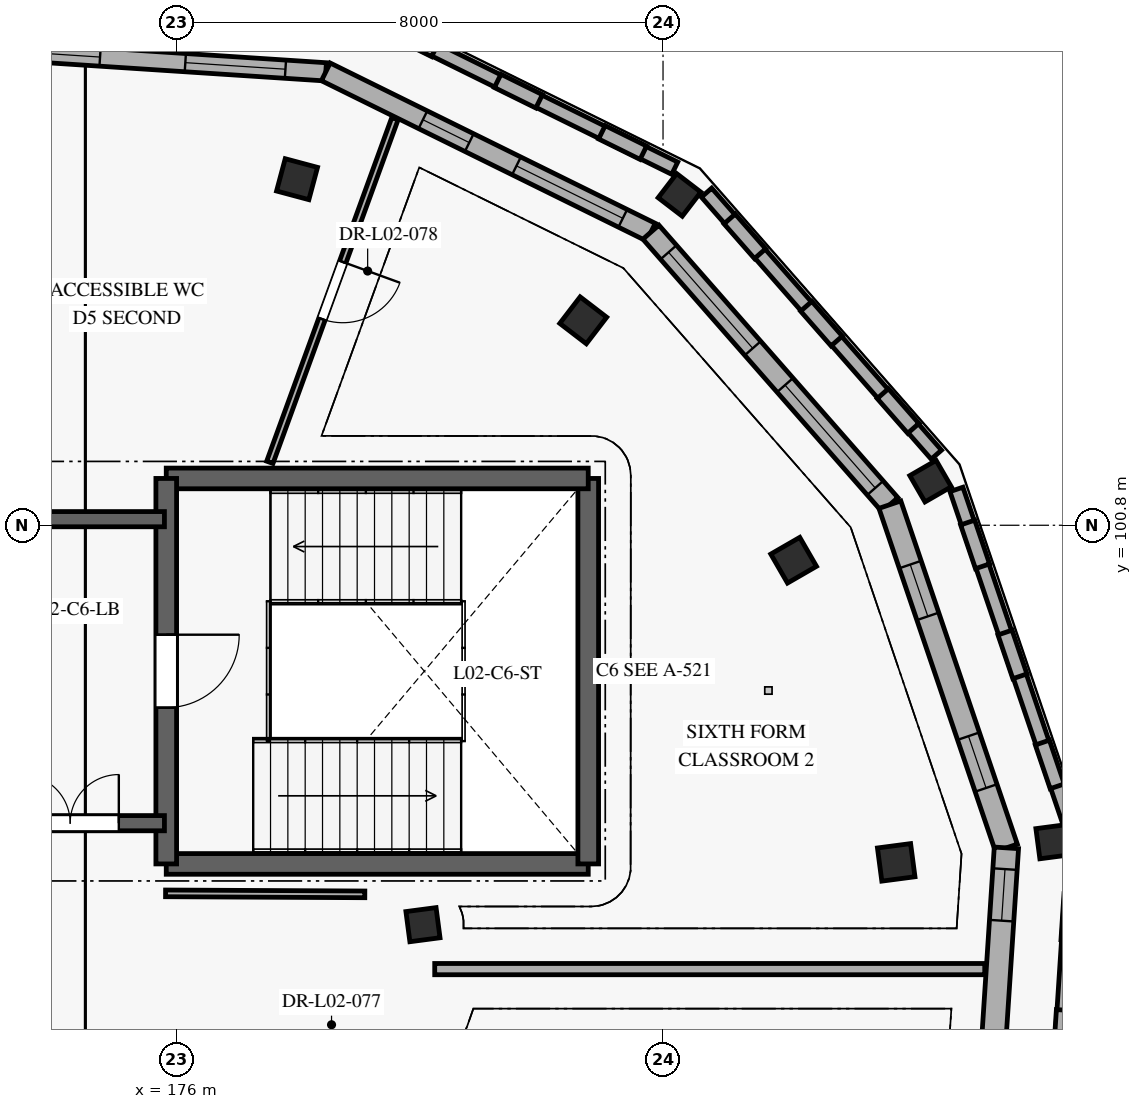
"""IFC4 building model, lengths in metres.
Left out: names, types, materials, properties, quantities, classifications, styles, units other than length and angle.
Written with IfcOpenShell. Run it as: python <this file> out.ifc"""

import sys

from ifc_helpers import new_model, si_unit, direction, frame, frame_2d, origin, origin_2d, place, context, subcontext, project, spatial, rectangle, extrude, element, fill, save


model = new_model("IFC4")
c1 = context("Model", 3, precision=1e-05, world=origin(), true_north=direction((0.0, 1.0)))
c2 = subcontext(c1, "Body", "Model", "MODEL_VIEW")
j1 = project(units=[si_unit("LENGTHUNIT", "METRE"), si_unit("PLANEANGLEUNIT", "RADIAN")], contexts=[c1])
p1 = place(None, origin())
s1 = spatial("IfcSite", under=j1, at=p1, CompositionType="ELEMENT")
p2 = place(p1, origin())
s2 = spatial("IfcBuilding", under=s1, at=p2, CompositionType="ELEMENT")
p3 = place(p2, frame((0.0, 0.0, 8.4)))
s3 = spatial("IfcBuildingStorey", under=s2, at=p3, CompositionType="ELEMENT", Elevation=8.4)
for number, where, z_axis, x_axis in (
    (1, (190.413, 95.595, 0.0), (0.0, 0.0, 1.0), (-0.131, 0.991, 0.0)),
    (2, (188.4, 101.525, 0.0), (0.0, 0.0, 1.0), (-0.5, 0.866, 0.0)),
    (3, (184.271, 106.233, 0.0), (0.0, 0.0, 1.0), (-0.793, 0.609, 0.0)),
):
    element("IfcColumn", number, at=place(p3, frame(where, z_axis=z_axis, x_axis=x_axis)), inside=s3, PredefinedType="COLUMN", context=c2, shape_type="SweptSolid", body=[
        extrude(rectangle(XDim=0.5, YDim=0.5, at=origin_2d()), origin(), (0.0, 0.0, 1.0), 4.2),
    ])
for number, where, z_axis, x_axis in (
    (4, (187.835, 95.256, 0.0), (0.0, 0.0, 1.0), (-0.131, 0.991, 0.0)),
    (5, (186.148, 100.225, 0.0), (0.0, 0.0, 1.0), (-0.5, 0.866, 0.0)),
    (6, (182.688, 104.171, 0.0), (0.0, 0.0, 1.0), (-0.793, 0.609, 0.0)),
    (7, (177.981, 106.492, 0.0), (0.0, 0.0, 1.0), (-0.966, 0.259, 0.0)),
):
    element("IfcColumn", number, at=place(p3, frame(where, z_axis=z_axis, x_axis=x_axis)), inside=s3, PredefinedType="COLUMN", context=c2, shape_type="SweptSolid", body=[
        extrude(rectangle(XDim=0.55, YDim=0.55, at=origin_2d()), origin(), (0.0, 0.0, 1.0), 4.2),
    ])
p4 = place(p3, frame((180.052, 94.231, 0.0), z_axis=(0.0, 0.0, 1.0), x_axis=(0.991444861374, 0.13052619222, 0.0)))
e8 = element("IfcColumn", 8, at=p4, inside=s3, PredefinedType="COLUMN", context=c2, shape_type="SweptSolid", body=[
    extrude(rectangle(XDim=0.5, YDim=0.5, at=origin_2d()), origin(), (0.0, 0.0, 1.0), 4.2),
])
p5 = place(p3, frame((172.506, 108.647, 0.0), z_axis=(0.0, 0.0, 1.0), x_axis=(0.997858658418, -0.065407169492, 0.0)))
e9 = element("IfcWall", 9, at=p5, inside=s3, PredefinedType="SOLIDWALL", context=c2, shape_type="SweptSolid", body=[
    extrude(rectangle(XDim=5.961, YDim=0.3, at=frame_2d((2.98, 0.0))), origin(), (0.0, 0.0, 1.0), 3.94),
])
p6 = place(p5, frame((0.74, 0.0, 0.85)))
e10 = element("IfcOpeningElement", 10, at=p6, cuts=e9, PredefinedType="OPENING", context=c2, shape_type="SweptSolid", body=[
    extrude(rectangle(XDim=1.5, YDim=1.6, at=frame_2d((0.75, 0.8))), frame((0.0, 0.16, 0.0), z_axis=(0.0, -1.0, 0.0), x_axis=(1.0, 0.0, 0.0)), (0.0, 0.0, 1.0), 0.32),
])
p7 = place(p5, frame((3.646, 0.0, 0.85)))
e11 = element("IfcOpeningElement", 11, at=p7, cuts=e9, PredefinedType="OPENING", context=c2, shape_type="SweptSolid", body=[
    extrude(rectangle(XDim=1.65, YDim=1.6, at=frame_2d((0.825, 0.8))), frame((0.0, 0.16, 0.0), z_axis=(0.0, -1.0, 0.0), x_axis=(1.0, 0.0, 0.0)), (0.0, 0.0, 1.0), 0.32),
])
p8 = place(p3, frame((178.454, 108.257, 0.0), z_axis=(0.0, 0.0, 1.0), x_axis=(0.896879104746, -0.442275786664, 0.0)))
e12 = element("IfcWall", 12, at=p8, inside=s3, PredefinedType="SOLIDWALL", context=c2, shape_type="SweptSolid", body=[
    extrude(rectangle(XDim=5.961, YDim=0.325, at=frame_2d((2.98, 0.0))), origin(), (0.0, 0.0, 1.0), 3.94),
])
p9 = place(p8, frame((1.781, 0.0, 0.85)))
e13 = element("IfcOpeningElement", 13, at=p9, cuts=e12, PredefinedType="OPENING", context=c2, shape_type="SweptSolid", body=[
    extrude(rectangle(XDim=0.85, YDim=1.4, at=frame_2d((0.425, 0.7))), frame((0.0, 0.172, 0.0), z_axis=(0.0, -1.0, 0.0), x_axis=(1.0, 0.0, 0.0)), (0.0, 0.0, 1.0), 0.345),
])
p10 = place(p8, frame((3.496, 0.0, 0.85)))
e14 = element("IfcOpeningElement", 14, at=p10, cuts=e12, PredefinedType="OPENING", context=c2, shape_type="SweptSolid", body=[
    extrude(rectangle(XDim=1.95, YDim=1.6, at=frame_2d((0.975, 0.8))), frame((0.0, 0.172, 0.0), z_axis=(0.0, -1.0, 0.0), x_axis=(1.0, 0.0, 0.0)), (0.0, 0.0, 1.0), 0.345),
])
p11 = place(p3, frame((183.801, 105.621, 0.0), z_axis=(0.0, 0.0, 1.0), x_axis=(0.659353757459, -0.751832842143, 0.0)))
e15 = element("IfcWall", 15, at=p11, inside=s3, PredefinedType="SOLIDWALL", context=c2, shape_type="SweptSolid", body=[
    extrude(rectangle(XDim=5.961, YDim=0.35, at=frame_2d((2.98, 0.0))), origin(), (0.0, 0.0, 1.0), 3.94),
])
p12 = place(p11, frame((0.44, 0.0, 0.85)))
e16 = element("IfcOpeningElement", 16, at=p12, cuts=e15, PredefinedType="OPENING", context=c2, shape_type="SweptSolid", body=[
    extrude(rectangle(XDim=2.1, YDim=1.6, at=frame_2d((1.05, 0.8))), frame((0.0, 0.185, 0.0), z_axis=(0.0, -1.0, 0.0), x_axis=(1.0, 0.0, 0.0)), (0.0, 0.0, 1.0), 0.37),
])
p13 = place(p11, frame((3.346, 0.0, 0.85)))
e17 = element("IfcOpeningElement", 17, at=p13, cuts=e15, PredefinedType="OPENING", context=c2, shape_type="SweptSolid", body=[
    extrude(rectangle(XDim=2.25, YDim=1.6, at=frame_2d((1.125, 0.8))), frame((0.0, 0.185, 0.0), z_axis=(0.0, -1.0, 0.0), x_axis=(1.0, 0.0, 0.0)), (0.0, 0.0, 1.0), 0.37),
])
p14 = place(p3, frame((187.731, 101.139, 0.0), z_axis=(0.0, 0.0, 1.0), x_axis=(0.321420298269, -0.94693663561, 0.0)))
e18 = element("IfcWall", 18, at=p14, inside=s3, PredefinedType="SOLIDWALL", context=c2, shape_type="SweptSolid", body=[
    extrude(rectangle(XDim=5.961, YDim=0.38, at=frame_2d((2.98, 0.0))), origin(), (0.0, 0.0, 1.0), 3.94),
])
p15 = place(p14, frame((1.04, 0.0, 0.85)))
e19 = element("IfcOpeningElement", 19, at=p15, cuts=e18, PredefinedType="OPENING", context=c2, shape_type="SweptSolid", body=[
    extrude(rectangle(XDim=0.9, YDim=1.6, at=frame_2d((0.45, 0.8))), frame((0.0, 0.2, 0.0), z_axis=(0.0, -1.0, 0.0), x_axis=(1.0, 0.0, 0.0)), (0.0, 0.0, 1.0), 0.4),
])
p16 = place(p14, frame((4.021, 0.0, 0.85)))
e20 = element("IfcOpeningElement", 20, at=p16, cuts=e18, PredefinedType="OPENING", context=c2, shape_type="SweptSolid", body=[
    extrude(rectangle(XDim=0.9, YDim=1.6, at=frame_2d((0.45, 0.8))), frame((0.0, 0.2, 0.0), z_axis=(0.0, -1.0, 0.0), x_axis=(1.0, 0.0, 0.0)), (0.0, 0.0, 1.0), 0.4),
])
p17 = place(p3, frame((189.647, 95.494, 0.0), z_axis=(0.0, 0.0, 1.0), x_axis=(-0.065407169492, -0.997858658418, 0.0)))
e21 = element("IfcWall", 21, at=p17, inside=s3, PredefinedType="SOLIDWALL", context=c2, shape_type="SweptSolid", body=[
    extrude(rectangle(XDim=5.961, YDim=0.4, at=frame_2d((2.98, 0.0))), origin(), (0.0, 0.0, 1.0), 3.94),
])
p18 = place(p17, frame((0.35, 0.0, 0.85)))
e22 = element("IfcOpeningElement", 22, at=p18, cuts=e21, PredefinedType="OPENING", context=c2, shape_type="SweptSolid", body=[
    extrude(rectangle(XDim=0.85, YDim=1.4, at=frame_2d((0.425, 0.7))), frame((0.0, 0.21, 0.0), z_axis=(0.0, -1.0, 0.0), x_axis=(1.0, 0.0, 0.0)), (0.0, 0.0, 1.0), 0.42),
])
p19 = place(p17, frame((3.896, 0.0, 0.85)))
e23 = element("IfcOpeningElement", 23, at=p19, cuts=e21, PredefinedType="OPENING", context=c2, shape_type="SweptSolid", body=[
    extrude(rectangle(XDim=1.15, YDim=1.8, at=frame_2d((0.575, 0.9))), frame((0.0, 0.21, 0.0), z_axis=(0.0, -1.0, 0.0), x_axis=(1.0, 0.0, 0.0)), (0.0, 0.0, 1.0), 0.42),
])
p20 = place(p3, frame((190.668, 95.961, 0.0), z_axis=(0.0, 0.0, 1.0), x_axis=(-0.321474350277, 0.946918286925, 0.0)))
e24 = element("IfcWall", 24, at=p20, inside=s3, PredefinedType="ELEMENTEDWALL", context=c2, shape_type="SweptSolid", body=[
    extrude(rectangle(XDim=5.732, YDim=0.225, at=frame_2d((2.866, 0.0))), origin(), (0.0, 0.0, 1.0), 1.09),
])
p21 = place(p3, frame((190.483, 96.506, 1.09), z_axis=(0.0, 0.0, 1.0), x_axis=(-0.321332364617, 0.946966478525, 0.0)))
e25 = element("IfcWall", 25, at=p21, inside=s3, PredefinedType="ELEMENTEDWALL", context=c2, shape_type="SweptSolid", body=[
    extrude(rectangle(XDim=0.76, YDim=0.245, at=frame_2d((0.38, 0.0))), origin(), (0.0, 0.0, 1.0), 2.85),
])
p22 = place(p3, frame((189.869, 98.316, 1.09), z_axis=(0.0, 0.0, 1.0), x_axis=(-0.32123461411, 0.946999642396, 0.0)))
e26 = element("IfcWall", 26, at=p22, inside=s3, PredefinedType="ELEMENTEDWALL", context=c2, shape_type="SweptSolid", body=[
    extrude(rectangle(XDim=0.76, YDim=0.245, at=frame_2d((0.38, 0.0))), origin(), (0.0, 0.0, 1.0), 2.85),
])
p23 = place(p3, frame((189.254, 100.125, 1.09), z_axis=(0.0, 0.0, 1.0), x_axis=(-0.321332364617, 0.946966478525, 0.0)))
e27 = element("IfcWall", 27, at=p23, inside=s3, PredefinedType="ELEMENTEDWALL", context=c2, shape_type="SweptSolid", body=[
    extrude(rectangle(XDim=0.76, YDim=0.245, at=frame_2d((0.38, 0.0))), origin(), (0.0, 0.0, 1.0), 2.85),
])
p24 = place(p3, frame((188.495, 101.961, 0.0), z_axis=(0.0, 0.0, 1.0), x_axis=(-0.659360536521, 0.751826896884, 0.0)))
e28 = element("IfcWall", 28, at=p24, inside=s3, PredefinedType="ELEMENTEDWALL", context=c2, shape_type="SweptSolid", body=[
    extrude(rectangle(XDim=5.732, YDim=0.225, at=frame_2d((2.866, 0.0))), origin(), (0.0, 0.0, 1.0), 1.09),
])
p25 = place(p3, frame((188.116, 102.394, 1.09), z_axis=(0.0, 0.0, 1.0), x_axis=(-0.659504701015, 0.751700438565, 0.0)))
e29 = element("IfcWall", 29, at=p25, inside=s3, PredefinedType="ELEMENTEDWALL", context=c2, shape_type="SweptSolid", body=[
    extrude(rectangle(XDim=0.76, YDim=0.245, at=frame_2d((0.38, 0.0))), origin(), (0.0, 0.0, 1.0), 2.85),
])
for number, where, z_axis, x_axis in (
    (30, (186.856, 103.83, 1.09), (0.0, 0.0, 1.0), (-0.659, 0.752, 0.0)),
    (31, (185.596, 105.267, 1.09), (0.0, 0.0, 1.0), (-0.659, 0.752, 0.0)),
):
    element("IfcWall", number, at=place(p3, frame(where, z_axis=z_axis, x_axis=x_axis)), inside=s3, PredefinedType="ELEMENTEDWALL", context=c2, shape_type="SweptSolid", body=[
        extrude(rectangle(XDim=0.76, YDim=0.245, at=frame_2d((0.38, 0.0))), origin(), (0.0, 0.0, 1.0), 2.85),
    ])
p26 = place(p3, frame((184.192, 106.673, 0.0), z_axis=(0.0, 0.0, 1.0), x_axis=(-0.896866705119, 0.442300930644, 0.0)))
e32 = element("IfcWall", 32, at=p26, inside=s3, PredefinedType="ELEMENTEDWALL", context=c2, shape_type="SweptSolid", body=[
    extrude(rectangle(XDim=5.733, YDim=0.225, at=frame_2d((2.866, 0.0))), origin(), (0.0, 0.0, 1.0), 1.09),
])
for number, where, z_axis, x_axis in (
    (33, (183.676, 106.927, 1.09), (0.0, 0.0, 1.0), (-0.897, 0.442, 0.0)),
    (34, (181.962, 107.772, 1.09), (0.0, 0.0, 1.0), (-0.897, 0.442, 0.0)),
    (35, (180.249, 108.618, 1.09), (0.0, 0.0, 1.0), (-0.897, 0.442, 0.0)),
):
    element("IfcWall", number, at=place(p3, frame(where, z_axis=z_axis, x_axis=x_axis)), inside=s3, PredefinedType="ELEMENTEDWALL", context=c2, shape_type="SweptSolid", body=[
        extrude(rectangle(XDim=0.76, YDim=0.245, at=frame_2d((0.38, 0.0))), origin(), (0.0, 0.0, 1.0), 2.85),
    ])
p27 = place(p3, frame((190.379, 89.587, 0.0), z_axis=(0.0, 0.0, 1.0), x_axis=(0.065416558003, 0.99785804298, 0.0)))
e36 = element("IfcWall", 36, at=p27, inside=s3, PredefinedType="ELEMENTEDWALL", context=c2, shape_type="SweptSolid", body=[
    extrude(rectangle(XDim=5.732, YDim=0.225, at=frame_2d((2.866, 0.0))), origin(), (0.0, 0.0, 1.0), 1.09),
])
for number, where, z_axis, x_axis in (
    (37, (190.542, 92.068, 1.09), (0.0, 0.0, 1.0), (0.066, 0.998, 0.0)),
    (38, (190.667, 93.975, 1.09), (0.0, 0.0, 1.0), (0.066, 0.998, 0.0)),
):
    element("IfcWall", number, at=place(p3, frame(where, z_axis=z_axis, x_axis=x_axis)), inside=s3, PredefinedType="ELEMENTEDWALL", context=c2, shape_type="SweptSolid", body=[
        extrude(rectangle(XDim=0.76, YDim=0.245, at=frame_2d((0.38, 0.0))), origin(), (0.0, 0.0, 1.0), 2.85),
    ])
p28 = place(p3, frame((175.83, 95.23, 0.0), z_axis=(0.0, 0.0, 1.0), x_axis=(1.0, 0.0, 0.0)))
e39 = element("IfcWall", 39, at=p28, inside=s3, PredefinedType="SHEAR", context=c2, shape_type="SweptSolid", body=[
    extrude(rectangle(XDim=6.94, YDim=0.34, at=frame_2d((3.47, 0.0))), origin(), (0.0, 0.0, 1.0), 3.95),
])
p29 = place(p3, frame((182.77, 95.23, 0.0), z_axis=(0.0, 0.0, 1.0), x_axis=(0.0, 1.0, 0.0)))
e40 = element("IfcWall", 40, at=p29, inside=s3, PredefinedType="SHEAR", context=c2, shape_type="SweptSolid", body=[
    extrude(rectangle(XDim=6.34, YDim=0.34, at=frame_2d((3.17, 0.0))), origin(), (0.0, 0.0, 1.0), 3.95),
])
p30 = place(p3, frame((182.77, 101.57, 0.0), z_axis=(0.0, 0.0, 1.0), x_axis=(-1.0, 0.0, 0.0)))
e41 = element("IfcWall", 41, at=p30, inside=s3, PredefinedType="SHEAR", context=c2, shape_type="SweptSolid", body=[
    extrude(rectangle(XDim=6.94, YDim=0.34, at=frame_2d((3.47, 0.0))), origin(), (0.0, 0.0, 1.0), 3.95),
])
p31 = place(p3, frame((175.83, 101.57, 0.0), z_axis=(0.0, 0.0, 1.0), x_axis=(0.0, -1.0, 0.0)))
e42 = element("IfcWall", 42, at=p31, inside=s3, PredefinedType="SHEAR", context=c2, shape_type="SweptSolid", body=[
    extrude(rectangle(XDim=6.34, YDim=0.34, at=frame_2d((3.17, 0.0))), origin(), (0.0, 0.0, 1.0), 3.95),
])
p32 = place(p31, frame((2.57, 0.0, 0.0)))
e43 = element("IfcOpeningElement", 43, at=p32, cuts=e42, PredefinedType="OPENING", context=c2, shape_type="SweptSolid", body=[
    extrude(rectangle(XDim=1.2, YDim=2.1, at=frame_2d((0.6, 1.05))), frame((0.0, 0.18, 0.0), z_axis=(0.0, -1.0, 0.0), x_axis=(1.0, 0.0, 0.0)), (0.0, 0.0, 1.0), 0.36),
])
p33 = place(p3, frame((172.7, 95.9, 0.0), z_axis=(0.0, 0.0, 1.0), x_axis=(1.0, 0.0, 0.0)))
e44 = element("IfcWall", 44, at=p33, inside=s3, PredefinedType="SHEAR", context=c2, shape_type="SweptSolid", body=[
    extrude(rectangle(XDim=3.1, YDim=0.25, at=frame_2d((1.55, 0.0))), origin(), (0.0, 0.0, 1.0), 3.95),
])
p34 = place(p33, frame((0.75, 0.0, 0.0)))
e45 = element("IfcOpeningElement", 45, at=p34, cuts=e44, PredefinedType="OPENING", context=c2, shape_type="SweptSolid", body=[
    extrude(rectangle(XDim=1.6, YDim=2.15, at=frame_2d((0.8, 1.075))), frame((0.0, 0.135, 0.0), z_axis=(0.0, -1.0, 0.0), x_axis=(1.0, 0.0, 0.0)), (0.0, 0.0, 1.0), 0.27),
])
p35 = place(p3, frame((175.8, 100.9, 0.0), z_axis=(0.0, 0.0, 1.0), x_axis=(-1.0, 0.0, 0.0)))
e46 = element("IfcWall", 46, at=p35, inside=s3, PredefinedType="SHEAR", context=c2, shape_type="SweptSolid", body=[
    extrude(rectangle(XDim=3.1, YDim=0.25, at=frame_2d((1.55, 0.0))), origin(), (0.0, 0.0, 1.0), 3.95),
])
p36 = place(p3, frame((189.291, 93.5, 0.0), z_axis=(0.0, 0.0, 1.0), x_axis=(-1.0, 0.0, 0.0)))
e47 = element("IfcWall", 47, at=p36, inside=s3, PredefinedType="PARTITIONING", context=c2, shape_type="SweptSolid", body=[
    extrude(rectangle(XDim=9.046, YDim=0.185, at=frame_2d((4.523, 0.0))), origin(), (0.0, 0.0, 1.0), 3.9),
])
p37 = place(p3, frame((179.591, 107.487, 0.0), z_axis=(0.0, 0.0, 1.0), x_axis=(-0.34203308638, -0.939687909798, 0.0)))
e48 = element("IfcWall", 48, at=p37, inside=s3, PredefinedType="PARTITIONING", context=c2, shape_type="SweptSolid", body=[
    extrude(rectangle(XDim=6.015, YDim=0.11, at=frame_2d((3.008, 0.0))), origin(), (0.0, 0.0, 1.0), 3.9),
])
p38 = place(p37, frame((2.508, 0.0, 0.0)))
e49 = element("IfcOpeningElement", 49, at=p38, cuts=e48, PredefinedType="OPENING", context=c2, shape_type="SweptSolid", body=[
    extrude(rectangle(XDim=1.0, YDim=2.1, at=frame_2d((0.5, 1.05))), frame((0.0, 0.065, 0.0), z_axis=(0.0, -1.0, 0.0), x_axis=(1.0, 0.0, 0.0)), (0.0, 0.0, 1.0), 0.13),
])
p39 = place(p3, frame((175.819, 94.746, 0.0), z_axis=(0.0, 0.0, 1.0), x_axis=(0.999987908498, -0.004917606882, 0.0)))
e50 = element("IfcWall", 50, at=p39, inside=s3, PredefinedType="PARTITIONING", context=c2, shape_type="SweptSolid", body=[
    extrude(rectangle(XDim=3.277, YDim=0.11, at=frame_2d((1.638, 0.0))), origin(), (0.0, 0.0, 1.0), 3.9),
])
p40 = place(p6, origin())
e51 = element("IfcWindow", 51, at=p40, inside=s3, PartitioningType="SINGLE_PANEL", PredefinedType="WINDOW", context=c2, shape_type="SweptSolid", body=[
    extrude(rectangle(XDim=1.5, YDim=1.6, at=frame_2d((0.75, 0.8))), frame((0.0, 0.03, 0.0), z_axis=(0.0, -1.0, 0.0), x_axis=(1.0, 0.0, 0.0)), (0.0, 0.0, 1.0), 0.06),
])
fill(e10, e51)
p41 = place(p7, origin())
e52 = element("IfcWindow", 52, at=p41, inside=s3, PartitioningType="SINGLE_PANEL", PredefinedType="WINDOW", context=c2, shape_type="SweptSolid", body=[
    extrude(rectangle(XDim=1.65, YDim=1.6, at=frame_2d((0.825, 0.8))), frame((0.0, 0.03, 0.0), z_axis=(0.0, -1.0, 0.0), x_axis=(1.0, 0.0, 0.0)), (0.0, 0.0, 1.0), 0.06),
])
fill(e11, e52)
p42 = place(p9, origin())
e53 = element("IfcWindow", 53, at=p42, inside=s3, PartitioningType="SINGLE_PANEL", PredefinedType="WINDOW", context=c2, shape_type="SweptSolid", body=[
    extrude(rectangle(XDim=0.85, YDim=1.4, at=frame_2d((0.425, 0.7))), frame((0.0, 0.03, 0.0), z_axis=(0.0, -1.0, 0.0), x_axis=(1.0, 0.0, 0.0)), (0.0, 0.0, 1.0), 0.06),
])
fill(e13, e53)
p43 = place(p10, origin())
e54 = element("IfcWindow", 54, at=p43, inside=s3, PartitioningType="SINGLE_PANEL", PredefinedType="WINDOW", context=c2, shape_type="SweptSolid", body=[
    extrude(rectangle(XDim=1.95, YDim=1.6, at=frame_2d((0.975, 0.8))), frame((0.0, 0.03, 0.0), z_axis=(0.0, -1.0, 0.0), x_axis=(1.0, 0.0, 0.0)), (0.0, 0.0, 1.0), 0.06),
])
fill(e14, e54)
p44 = place(p12, origin())
e55 = element("IfcWindow", 55, at=p44, inside=s3, PartitioningType="SINGLE_PANEL", PredefinedType="WINDOW", context=c2, shape_type="SweptSolid", body=[
    extrude(rectangle(XDim=2.1, YDim=1.6, at=frame_2d((1.05, 0.8))), frame((0.0, 0.03, 0.0), z_axis=(0.0, -1.0, 0.0), x_axis=(1.0, 0.0, 0.0)), (0.0, 0.0, 1.0), 0.06),
])
fill(e16, e55)
p45 = place(p13, origin())
e56 = element("IfcWindow", 56, at=p45, inside=s3, PartitioningType="SINGLE_PANEL", PredefinedType="WINDOW", context=c2, shape_type="SweptSolid", body=[
    extrude(rectangle(XDim=2.25, YDim=1.6, at=frame_2d((1.125, 0.8))), frame((0.0, 0.03, 0.0), z_axis=(0.0, -1.0, 0.0), x_axis=(1.0, 0.0, 0.0)), (0.0, 0.0, 1.0), 0.06),
])
fill(e17, e56)
p46 = place(p15, origin())
e57 = element("IfcWindow", 57, at=p46, inside=s3, PartitioningType="SINGLE_PANEL", PredefinedType="WINDOW", context=c2, shape_type="SweptSolid", body=[
    extrude(rectangle(XDim=0.9, YDim=1.6, at=frame_2d((0.45, 0.8))), frame((0.0, 0.03, 0.0), z_axis=(0.0, -1.0, 0.0), x_axis=(1.0, 0.0, 0.0)), (0.0, 0.0, 1.0), 0.06),
])
fill(e19, e57)
p47 = place(p16, origin())
e58 = element("IfcWindow", 58, at=p47, inside=s3, PartitioningType="SINGLE_PANEL", PredefinedType="WINDOW", context=c2, shape_type="SweptSolid", body=[
    extrude(rectangle(XDim=0.9, YDim=1.6, at=frame_2d((0.45, 0.8))), frame((0.0, 0.03, 0.0), z_axis=(0.0, -1.0, 0.0), x_axis=(1.0, 0.0, 0.0)), (0.0, 0.0, 1.0), 0.06),
])
fill(e20, e58)
p48 = place(p18, origin())
e59 = element("IfcWindow", 59, at=p48, inside=s3, PartitioningType="SINGLE_PANEL", PredefinedType="WINDOW", context=c2, shape_type="SweptSolid", body=[
    extrude(rectangle(XDim=0.85, YDim=1.4, at=frame_2d((0.425, 0.7))), frame((0.0, 0.03, 0.0), z_axis=(0.0, -1.0, 0.0), x_axis=(1.0, 0.0, 0.0)), (0.0, 0.0, 1.0), 0.06),
])
fill(e22, e59)
p49 = place(p32, origin())
e60 = element("IfcDoor", 60, at=p49, inside=s3, OperationType="SINGLE_SWING_LEFT", PredefinedType="DOOR", context=c2, shape_type="SweptSolid", body=[
    extrude(rectangle(XDim=1.2, YDim=2.1, at=frame_2d((0.6, 1.05))), frame((0.0, 0.025, 0.0), z_axis=(0.0, -1.0, 0.0), x_axis=(1.0, 0.0, 0.0)), (0.0, 0.0, 1.0), 0.05),
])
fill(e43, e60)
p50 = place(p34, origin())
e61 = element("IfcDoor", 61, at=p50, inside=s3, OperationType="DOUBLE_DOOR_SINGLE_SWING", PredefinedType="DOOR", context=c2, shape_type="SweptSolid", body=[
    extrude(rectangle(XDim=1.6, YDim=2.15, at=frame_2d((0.8, 1.075))), frame((0.0, 0.025, 0.0), z_axis=(0.0, -1.0, 0.0), x_axis=(1.0, 0.0, 0.0)), (0.0, 0.0, 1.0), 0.05),
])
fill(e45, e61)
p51 = place(p38, origin())
e62 = element("IfcDoor", 62, at=p51, inside=s3, OperationType="SINGLE_SWING_LEFT", PredefinedType="DOOR", context=c2, shape_type="SweptSolid", body=[
    extrude(rectangle(XDim=1.0, YDim=2.1, at=frame_2d((0.5, 1.05))), frame((0.0, 0.025, 0.0), z_axis=(0.0, -1.0, 0.0), x_axis=(1.0, 0.0, 0.0)), (0.0, 0.0, 1.0), 0.05),
])
fill(e49, e62)
save(model, sys.argv[1])
